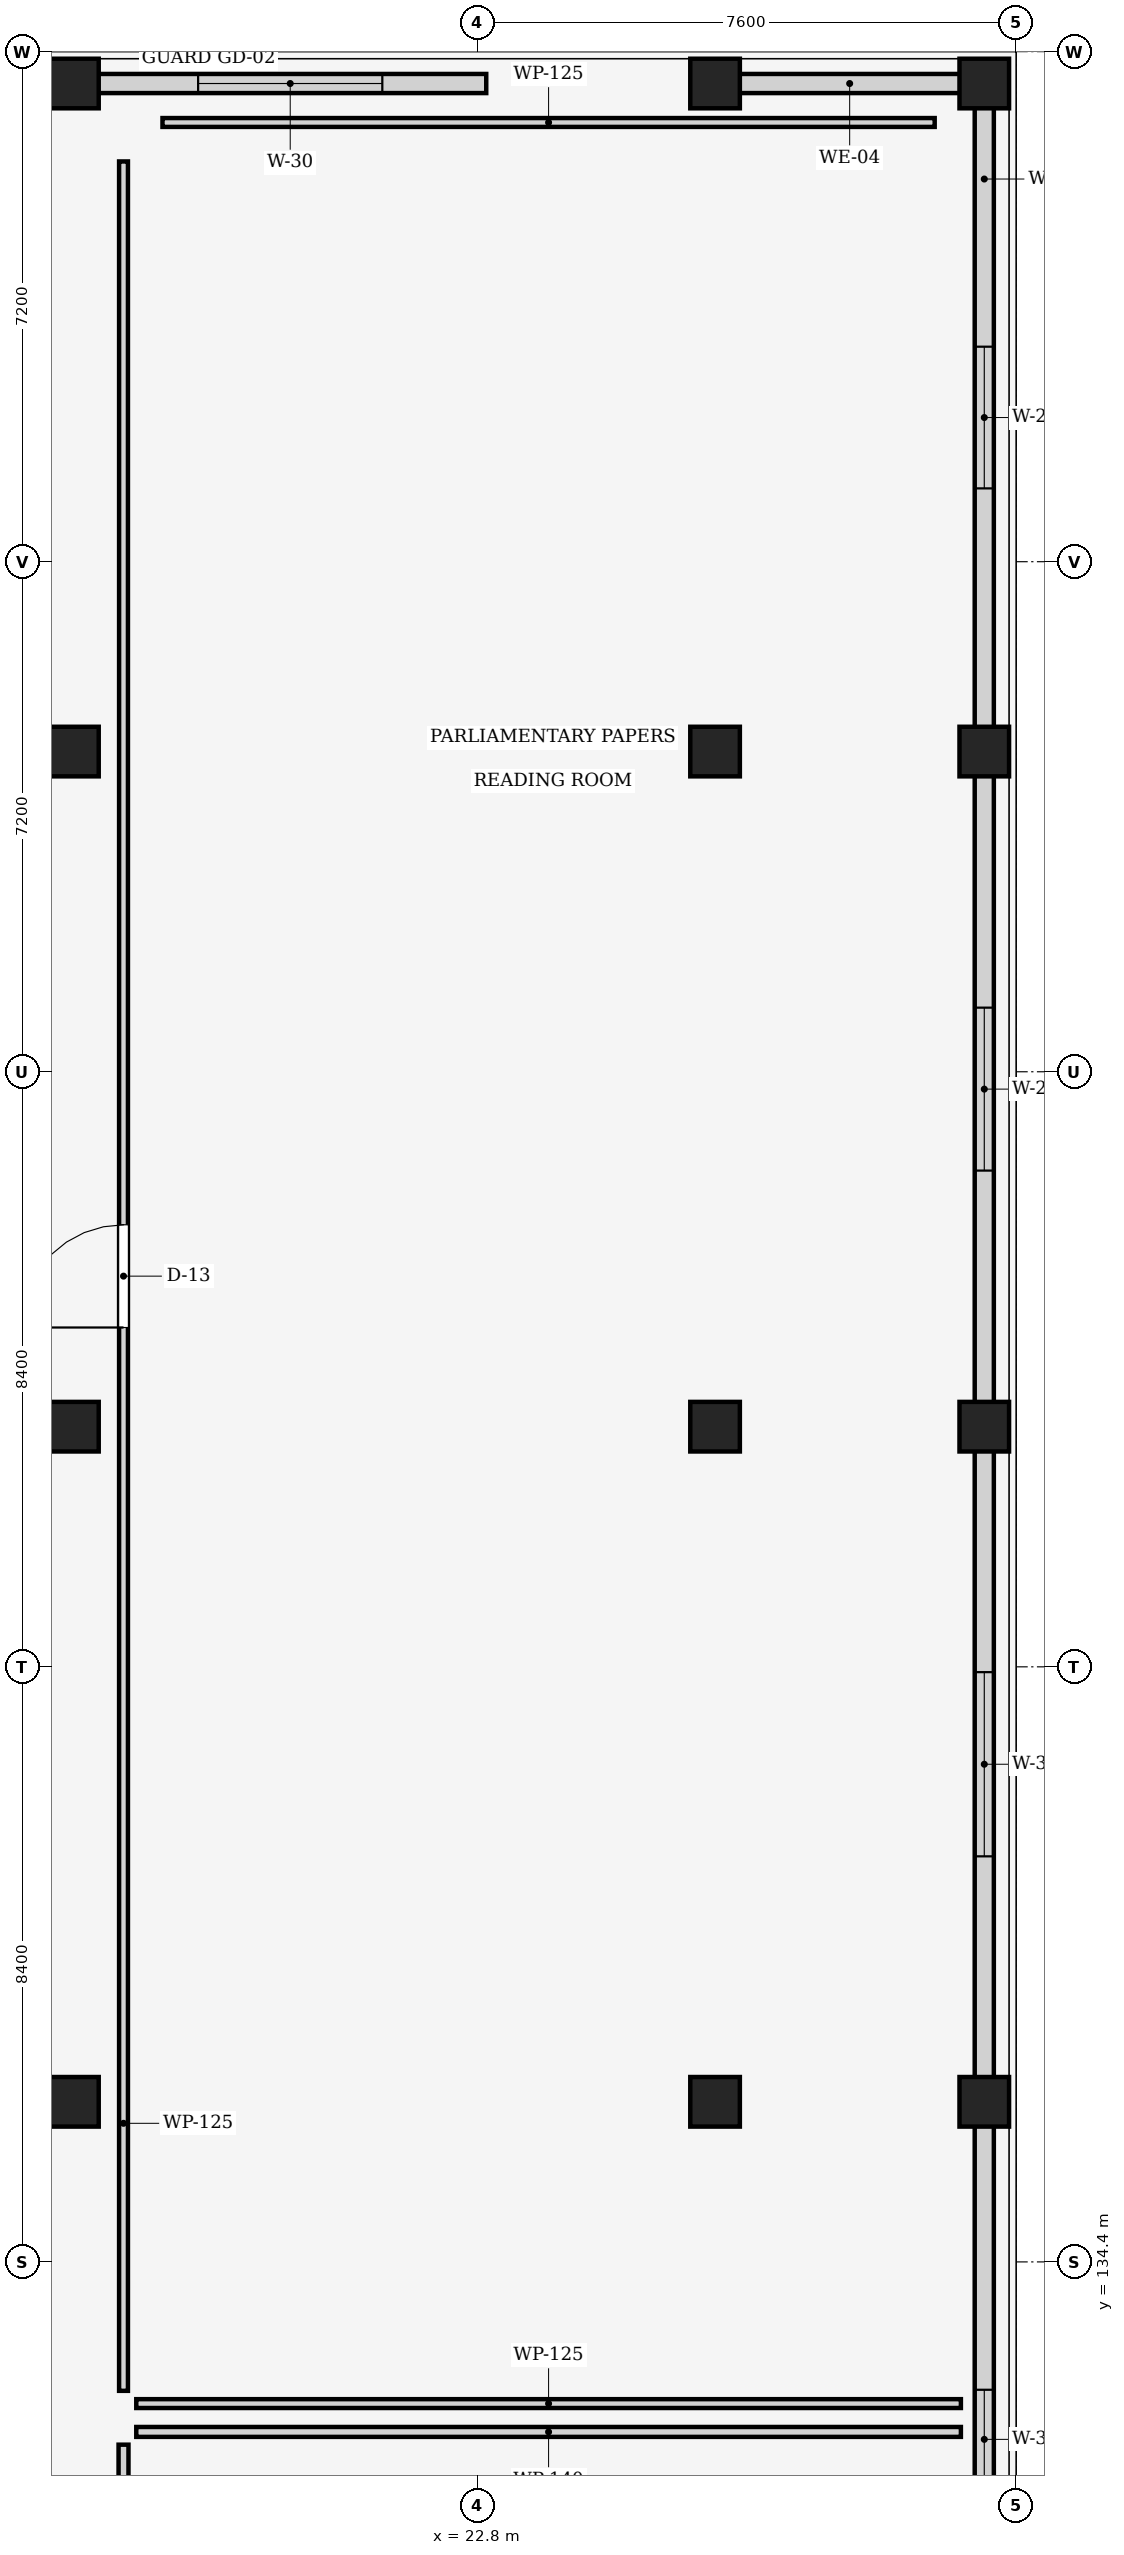
"""IFC4 building model, lengths in metres.
Left out: names, types, materials, properties, quantities, classifications, styles, units other than length and angle.
Written with IfcOpenShell. Run it as: python <this file> out.ifc"""

import sys

from ifc_helpers import new_model, si_unit, direction, frame, frame_2d, origin, origin_2d, place, context, subcontext, project, spatial, rectangle, extrude, element, fill, save


model = new_model("IFC4")
c1 = context("Model", 3, precision=1e-05, world=origin(), true_north=direction((0.0, 1.0)))
c2 = subcontext(c1, "Body", "Model", "MODEL_VIEW")
j1 = project(units=[si_unit("LENGTHUNIT", "METRE"), si_unit("PLANEANGLEUNIT", "RADIAN")], contexts=[c1])
p1 = place(None, origin())
s1 = spatial("IfcSite", under=j1, at=p1, CompositionType="ELEMENT")
p2 = place(p1, origin())
s2 = spatial("IfcBuilding", under=s1, at=p2, CompositionType="ELEMENT")
p3 = place(p2, frame((0.0, 0.0, 9.15)))
s3 = spatial("IfcBuildingStorey", under=s2, at=p3, CompositionType="ELEMENT", Elevation=9.15)
for number, where, z_axis, x_axis in (
    (1, (17.1, 136.66, 0.0), (0.0, 0.0, 1.0), (1.0, 0.0, 0.0)),
    (2, (17.1, 146.19, 0.0), (0.0, 0.0, 1.0), (1.0, 0.0, 0.0)),
    (3, (17.1, 155.72, 0.0), (0.0, 0.0, 1.0), (1.0, 0.0, 0.0)),
    (4, (17.1, 165.15, 0.0), (0.0, 0.0, 1.0), (1.0, 0.0, 0.0)),
    (5, (26.15, 136.66, 0.0), (0.0, 0.0, 1.0), (1.0, 0.0, 0.0)),
    (6, (26.15, 146.19, 0.0), (0.0, 0.0, 1.0), (1.0, 0.0, 0.0)),
    (7, (26.15, 155.72, 0.0), (0.0, 0.0, 1.0), (1.0, 0.0, 0.0)),
    (8, (26.15, 165.15, 0.0), (0.0, 0.0, 1.0), (1.0, 0.0, 0.0)),
    (9, (29.95, 136.66, 0.0), (0.0, 0.0, 1.0), (1.0, 0.0, 0.0)),
    (10, (29.95, 146.19, 0.0), (0.0, 0.0, 1.0), (1.0, 0.0, 0.0)),
    (11, (29.95, 155.72, 0.0), (0.0, 0.0, 1.0), (1.0, 0.0, 0.0)),
    (12, (29.95, 165.15, 0.0), (0.0, 0.0, 1.0), (1.0, 0.0, 0.0)),
):
    element("IfcColumn", number, at=place(p3, frame(where, z_axis=z_axis, x_axis=x_axis)), inside=s3, PredefinedType="COLUMN", context=c2, shape_type="SweptSolid", body=[
        extrude(rectangle(XDim=0.7, YDim=0.7, at=origin_2d()), origin(), (0.0, 0.0, 1.0), 4.05),
    ])
p4 = place(p3, frame((29.95, 164.865, 0.0), z_axis=(0.0, 0.0, 1.0), x_axis=(0.0, -1.0, 0.0)))
e13 = element("IfcWall", 13, at=p4, inside=s3, PredefinedType="STANDARD", context=c2, shape_type="SweptSolid", body=[
    extrude(rectangle(XDim=8.86, YDim=0.27, at=frame_2d((4.43, 0.0))), origin(), (0.0, 0.0, 1.0), 3.155),
])
p5 = place(p4, frame((3.43, 0.0, 0.85)))
e14 = element("IfcOpeningElement", 14, at=p5, cuts=e13, PredefinedType="OPENING", context=c2, shape_type="SweptSolid", body=[
    extrude(rectangle(XDim=2.0, YDim=1.85, at=frame_2d((1.0, 0.925))), frame((0.0, 0.145, 0.0), z_axis=(0.0, -1.0, 0.0), x_axis=(1.0, 0.0, 0.0)), (0.0, 0.0, 1.0), 0.29),
])
p6 = place(p3, frame((29.95, 155.435, 0.0), z_axis=(0.0, 0.0, 1.0), x_axis=(0.0, -1.0, 0.0)))
e15 = element("IfcWall", 15, at=p6, inside=s3, PredefinedType="STANDARD", context=c2, shape_type="SweptSolid", body=[
    extrude(rectangle(XDim=8.96, YDim=0.27, at=frame_2d((4.48, 0.0))), origin(), (0.0, 0.0, 1.0), 3.155),
])
p7 = place(p6, frame((3.33, 0.0, 0.85)))
e16 = element("IfcOpeningElement", 16, at=p7, cuts=e15, PredefinedType="OPENING", context=c2, shape_type="SweptSolid", body=[
    extrude(rectangle(XDim=2.3, YDim=1.85, at=frame_2d((1.15, 0.925))), frame((0.0, 0.145, 0.0), z_axis=(0.0, -1.0, 0.0), x_axis=(1.0, 0.0, 0.0)), (0.0, 0.0, 1.0), 0.29),
])
p8 = place(p3, frame((29.95, 145.905, 0.0), z_axis=(0.0, 0.0, 1.0), x_axis=(0.0, -1.0, 0.0)))
e17 = element("IfcWall", 17, at=p8, inside=s3, PredefinedType="STANDARD", context=c2, shape_type="SweptSolid", body=[
    extrude(rectangle(XDim=8.96, YDim=0.27, at=frame_2d((4.48, 0.0))), origin(), (0.0, 0.0, 1.0), 3.155),
])
p9 = place(p8, frame((3.18, 0.0, 0.85)))
e18 = element("IfcOpeningElement", 18, at=p9, cuts=e17, PredefinedType="OPENING", context=c2, shape_type="SweptSolid", body=[
    extrude(rectangle(XDim=2.6, YDim=1.85, at=frame_2d((1.3, 0.925))), frame((0.0, 0.145, 0.0), z_axis=(0.0, -1.0, 0.0), x_axis=(1.0, 0.0, 0.0)), (0.0, 0.0, 1.0), 0.29),
])
p10 = place(p3, frame((29.95, 136.375, 0.0), z_axis=(0.0, 0.0, 1.0), x_axis=(0.0, -1.0, 0.0)))
e19 = element("IfcWall", 19, at=p10, inside=s3, PredefinedType="STANDARD", context=c2, shape_type="SweptSolid", body=[
    extrude(rectangle(XDim=8.96, YDim=0.27, at=frame_2d((4.48, 0.0))), origin(), (0.0, 0.0, 1.0), 3.155),
])
p11 = place(p10, frame((3.78, 0.0, 0.85)))
e20 = element("IfcOpeningElement", 20, at=p11, cuts=e19, PredefinedType="OPENING", context=c2, shape_type="SweptSolid", body=[
    extrude(rectangle(XDim=1.4, YDim=2.05, at=frame_2d((0.7, 1.025))), frame((0.0, 0.145, 0.0), z_axis=(0.0, -1.0, 0.0), x_axis=(1.0, 0.0, 0.0)), (0.0, 0.0, 1.0), 0.29),
])
p12 = place(p3, frame((17.385, 165.15, 0.0), z_axis=(0.0, 0.0, 1.0), x_axis=(1.0, 0.0, 0.0)))
e21 = element("IfcWall", 21, at=p12, inside=s3, PredefinedType="STANDARD", context=c2, shape_type="SweptSolid", body=[
    extrude(rectangle(XDim=5.535, YDim=0.27, at=frame_2d((2.768, 0.0))), origin(), (0.0, 0.0, 1.0), 3.015),
])
p13 = place(p12, frame((1.468, 0.0, 0.85)))
e22 = element("IfcOpeningElement", 22, at=p13, cuts=e21, PredefinedType="OPENING", context=c2, shape_type="SweptSolid", body=[
    extrude(rectangle(XDim=2.6, YDim=1.85, at=frame_2d((1.3, 0.925))), frame((0.0, 0.145, 0.0), z_axis=(0.0, -1.0, 0.0), x_axis=(1.0, 0.0, 0.0)), (0.0, 0.0, 1.0), 0.29),
])
p14 = place(p3, frame((26.435, 165.15, 0.0), z_axis=(0.0, 0.0, 1.0), x_axis=(1.0, 0.0, 0.0)))
e23 = element("IfcWall", 23, at=p14, inside=s3, PredefinedType="STANDARD", context=c2, shape_type="SweptSolid", body=[
    extrude(rectangle(XDim=3.23, YDim=0.27, at=frame_2d((1.615, 0.0))), origin(), (0.0, 0.0, 1.0), 3.005),
])
p15 = place(p3, frame((17.8, 102.15, 0.0), z_axis=(0.0, 0.0, 1.0), x_axis=(0.0, 1.0, 0.0)))
e24 = element("IfcWall", 24, at=p15, inside=s3, PredefinedType="PARTITIONING", context=c2, shape_type="SweptSolid", body=[
    extrude(rectangle(XDim=29.67, YDim=0.14, at=frame_2d((14.835, 0.0))), origin(), (0.0, 0.0, 1.0), 3.015),
])
p16 = place(p15, frame((13.335, 0.0, 0.0)))
e25 = element("IfcOpeningElement", 25, at=p16, cuts=e24, PredefinedType="OPENING", context=c2, shape_type="SweptSolid", body=[
    extrude(rectangle(XDim=1.3, YDim=2.22, at=frame_2d((0.65, 1.11))), frame((0.0, 0.08, 0.0), z_axis=(0.0, -1.0, 0.0), x_axis=(1.0, 0.0, 0.0)), (0.0, 0.0, 1.0), 0.16),
])
p17 = place(p3, frame((17.98, 132.0, 0.0), z_axis=(0.0, 0.0, 1.0), x_axis=(1.0, 0.0, 0.0)))
e26 = element("IfcWall", 26, at=p17, inside=s3, PredefinedType="PARTITIONING", context=c2, shape_type="SweptSolid", body=[
    extrude(rectangle(XDim=11.64, YDim=0.14, at=frame_2d((5.82, 0.0))), origin(), (0.0, 0.0, 1.0), 3.155),
])
p18 = place(p3, frame((17.8, 132.58, 0.0), z_axis=(0.0, 0.0, 1.0), x_axis=(0.0, 1.0, 0.0)))
e27 = element("IfcWall", 27, at=p18, inside=s3, PredefinedType="PARTITIONING", context=c2, shape_type="SweptSolid", body=[
    extrude(rectangle(XDim=31.47, YDim=0.125, at=frame_2d((15.735, 0.0))), origin(), (0.0, 0.0, 1.0), 3.015),
])
p19 = place(p18, frame((15.01, 0.0, 0.0)))
e28 = element("IfcOpeningElement", 28, at=p19, cuts=e27, PredefinedType="OPENING", context=c2, shape_type="SweptSolid", body=[
    extrude(rectangle(XDim=1.45, YDim=2.22, at=frame_2d((0.725, 1.11))), frame((0.0, 0.073, 0.0), z_axis=(0.0, -1.0, 0.0), x_axis=(1.0, 0.0, 0.0)), (0.0, 0.0, 1.0), 0.145),
])
p20 = place(p3, frame((29.62, 132.4, 0.0), z_axis=(0.0, 0.0, 1.0), x_axis=(-1.0, 0.0, 0.0)))
e29 = element("IfcWall", 29, at=p20, inside=s3, PredefinedType="PARTITIONING", context=c2, shape_type="SweptSolid", body=[
    extrude(rectangle(XDim=11.64, YDim=0.125, at=frame_2d((5.82, 0.0))), origin(), (0.0, 0.0, 1.0), 3.155),
])
p21 = place(p3, frame((18.35, 164.6, 0.0), z_axis=(0.0, 0.0, 1.0), x_axis=(1.0, 0.0, 0.0)))
e30 = element("IfcWall", 30, at=p21, inside=s3, PredefinedType="PARTITIONING", context=c2, shape_type="SweptSolid", body=[
    extrude(rectangle(XDim=10.9, YDim=0.125, at=frame_2d((5.45, 0.0))), origin(), (0.0, 0.0, 1.0), 3.165),
])
p22 = place(p5, origin())
e31 = element("IfcWindow", 31, at=p22, inside=s3, PartitioningType="SINGLE_PANEL", PredefinedType="WINDOW", context=c2, shape_type="SweptSolid", body=[
    extrude(rectangle(XDim=2.0, YDim=1.85, at=frame_2d((1.0, 0.925))), frame((0.0, 0.03, 0.0), z_axis=(0.0, -1.0, 0.0), x_axis=(1.0, 0.0, 0.0)), (0.0, 0.0, 1.0), 0.06),
])
fill(e14, e31)
p23 = place(p7, origin())
e32 = element("IfcWindow", 32, at=p23, inside=s3, PartitioningType="SINGLE_PANEL", PredefinedType="WINDOW", context=c2, shape_type="SweptSolid", body=[
    extrude(rectangle(XDim=2.3, YDim=1.85, at=frame_2d((1.15, 0.925))), frame((0.0, 0.03, 0.0), z_axis=(0.0, -1.0, 0.0), x_axis=(1.0, 0.0, 0.0)), (0.0, 0.0, 1.0), 0.06),
])
fill(e16, e32)
p24 = place(p9, origin())
e33 = element("IfcWindow", 33, at=p24, inside=s3, PartitioningType="SINGLE_PANEL", PredefinedType="WINDOW", context=c2, shape_type="SweptSolid", body=[
    extrude(rectangle(XDim=2.6, YDim=1.85, at=frame_2d((1.3, 0.925))), frame((0.0, 0.03, 0.0), z_axis=(0.0, -1.0, 0.0), x_axis=(1.0, 0.0, 0.0)), (0.0, 0.0, 1.0), 0.06),
])
fill(e18, e33)
p25 = place(p11, origin())
e34 = element("IfcWindow", 34, at=p25, inside=s3, PartitioningType="SINGLE_PANEL", PredefinedType="WINDOW", context=c2, shape_type="SweptSolid", body=[
    extrude(rectangle(XDim=1.4, YDim=2.05, at=frame_2d((0.7, 1.025))), frame((0.0, 0.03, 0.0), z_axis=(0.0, -1.0, 0.0), x_axis=(1.0, 0.0, 0.0)), (0.0, 0.0, 1.0), 0.06),
])
fill(e20, e34)
p26 = place(p13, origin())
e35 = element("IfcWindow", 35, at=p26, inside=s3, PartitioningType="SINGLE_PANEL", PredefinedType="WINDOW", context=c2, shape_type="SweptSolid", body=[
    extrude(rectangle(XDim=2.6, YDim=1.85, at=frame_2d((1.3, 0.925))), frame((0.0, 0.03, 0.0), z_axis=(0.0, -1.0, 0.0), x_axis=(1.0, 0.0, 0.0)), (0.0, 0.0, 1.0), 0.06),
])
fill(e22, e35)
p27 = place(p19, origin())
e36 = element("IfcDoor", 36, at=p27, inside=s3, OperationType="SINGLE_SWING_LEFT", PredefinedType="DOOR", context=c2, shape_type="SweptSolid", body=[
    extrude(rectangle(XDim=1.45, YDim=2.22, at=frame_2d((0.725, 1.11))), frame((0.0, 0.025, 0.0), z_axis=(0.0, -1.0, 0.0), x_axis=(1.0, 0.0, 0.0)), (0.0, 0.0, 1.0), 0.05),
])
fill(e28, e36)
save(model, sys.argv[1])
